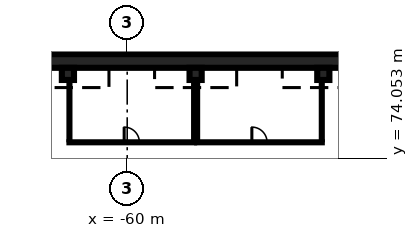
"""IFC4 building model, lengths in metres.
Left out: names, types, materials, properties, quantities, classifications, styles, units other than length and angle.
Written with IfcOpenShell. Run it as: python <this file> out.ifc"""

import sys

from ifc_helpers import new_model, si_unit, direction, frame, frame_2d, origin, origin_2d, place, context, subcontext, project, spatial, rectangle, extrude, element, fill, save


model = new_model("IFC4")
c1 = context("Model", 3, precision=1e-05, world=origin(), true_north=direction((0.0, 1.0)))
c2 = subcontext(c1, "Body", "Model", "MODEL_VIEW")
j1 = project(units=[si_unit("LENGTHUNIT", "METRE"), si_unit("PLANEANGLEUNIT", "RADIAN")], contexts=[c1])
p1 = place(None, origin())
s1 = spatial("IfcSite", under=j1, at=p1, CompositionType="ELEMENT")
p2 = place(p1, origin())
s2 = spatial("IfcBuilding", under=s1, at=p2, CompositionType="ELEMENT")
p3 = place(p2, frame((0.0, 0.0, -12.0)))
s3 = spatial("IfcBuildingStorey", under=s2, at=p3, CompositionType="ELEMENT", Elevation=-12.0)
p4 = place(p3, frame((-123.6, 80.45, 0.0), z_axis=(0.0, 0.0, 1.0), x_axis=(1.0, 0.0, 0.0)))
e1 = element("IfcWall", 1, at=p4, inside=s3, PredefinedType="USERDEFINED", context=c2, shape_type="SweptSolid", body=[
    extrude(rectangle(XDim=169.8, YDim=0.9, at=frame_2d((84.9, 0.0))), origin(), (0.0, 0.0, 1.0), 11.55),
])
for number, where, z_axis, x_axis in (
    (2, (-63.9, 79.6, 0.0), (0.0, 0.0, 1.0), (1.0, 0.0, 0.0)),
    (3, (-55.5, 79.6, 0.0), (0.0, 0.0, 1.0), (1.0, 0.0, 0.0)),
    (4, (-47.1, 79.6, 0.0), (0.0, 0.0, 1.0), (1.0, 0.0, 0.0)),
):
    element("IfcColumn", number, at=place(p3, frame(where, z_axis=z_axis, x_axis=x_axis)), inside=s3, PredefinedType="COLUMN", context=c2, shape_type="SweptSolid", body=[
        extrude(rectangle(XDim=0.8, YDim=0.8, at=origin_2d()), origin(), (0.0, 0.0, 1.0), 4.4),
    ])
p5 = place(p3, frame((-63.9, 75.1, 0.0), z_axis=(0.0, 0.0, 1.0), x_axis=(1.0, 0.0, 0.0)))
e5 = element("IfcWall", 5, at=p5, inside=s3, PredefinedType="PARTITIONING", context=c2, shape_type="SweptSolid", body=[
    extrude(rectangle(XDim=8.4, YDim=0.2, at=frame_2d((4.2, 0.0))), origin(), (0.0, 0.0, 1.0), 4.4),
])
p6 = place(p5, frame((3.7, 0.0, 0.0)))
e6 = element("IfcOpeningElement", 6, at=p6, cuts=e5, PredefinedType="OPENING", context=c2, shape_type="SweptSolid", body=[
    extrude(rectangle(XDim=1.0, YDim=2.1, at=frame_2d((0.5, 1.05))), frame((0.0, 0.11, 0.0), z_axis=(0.0, -1.0, 0.0), x_axis=(1.0, 0.0, 0.0)), (0.0, 0.0, 1.0), 0.22),
])
for number, where, z_axis, x_axis in (
    (7, (-63.8, 75.2, 0.0), (0.0, 0.0, 1.0), (0.0, 1.0, 0.0)),
    (8, (-55.6, 75.2, 0.0), (0.0, 0.0, 1.0), (0.0, 1.0, 0.0)),
):
    element("IfcWall", number, at=place(p3, frame(where, z_axis=z_axis, x_axis=x_axis)), inside=s3, PredefinedType="PARTITIONING", context=c2, shape_type="SweptSolid", body=[
        extrude(rectangle(XDim=4.0, YDim=0.2, at=frame_2d((2.0, 0.0))), origin(), (0.0, 0.0, 1.0), 4.4),
    ])
p7 = place(p3, frame((-55.5, 75.1, 0.0), z_axis=(0.0, 0.0, 1.0), x_axis=(1.0, 0.0, 0.0)))
e9 = element("IfcWall", 9, at=p7, inside=s3, PredefinedType="PARTITIONING", context=c2, shape_type="SweptSolid", body=[
    extrude(rectangle(XDim=8.4, YDim=0.2, at=frame_2d((4.2, 0.0))), origin(), (0.0, 0.0, 1.0), 4.4),
])
p8 = place(p7, frame((3.7, 0.0, 0.0)))
e10 = element("IfcOpeningElement", 10, at=p8, cuts=e9, PredefinedType="OPENING", context=c2, shape_type="SweptSolid", body=[
    extrude(rectangle(XDim=1.0, YDim=2.1, at=frame_2d((0.5, 1.05))), frame((0.0, 0.11, 0.0), z_axis=(0.0, -1.0, 0.0), x_axis=(1.0, 0.0, 0.0)), (0.0, 0.0, 1.0), 0.22),
])
for number, where, z_axis, x_axis in (
    (11, (-55.4, 75.2, 0.0), (0.0, 0.0, 1.0), (0.0, 1.0, 0.0)),
    (12, (-47.2, 75.2, 0.0), (0.0, 0.0, 1.0), (0.0, 1.0, 0.0)),
):
    element("IfcWall", number, at=place(p3, frame(where, z_axis=z_axis, x_axis=x_axis)), inside=s3, PredefinedType="PARTITIONING", context=c2, shape_type="SweptSolid", body=[
        extrude(rectangle(XDim=4.0, YDim=0.2, at=frame_2d((2.0, 0.0))), origin(), (0.0, 0.0, 1.0), 4.4),
    ])
p9 = place(p6, origin())
e13 = element("IfcDoor", 13, at=p9, inside=s3, OperationType="SINGLE_SWING_LEFT", PredefinedType="DOOR", context=c2, shape_type="SweptSolid", body=[
    extrude(rectangle(XDim=1.0, YDim=2.1, at=frame_2d((0.5, 1.05))), frame((0.0, 0.025, 0.0), z_axis=(0.0, -1.0, 0.0), x_axis=(1.0, 0.0, 0.0)), (0.0, 0.0, 1.0), 0.05),
])
fill(e6, e13)
p10 = place(p8, origin())
e14 = element("IfcDoor", 14, at=p10, inside=s3, OperationType="SINGLE_SWING_LEFT", PredefinedType="DOOR", context=c2, shape_type="SweptSolid", body=[
    extrude(rectangle(XDim=1.0, YDim=2.1, at=frame_2d((0.5, 1.05))), frame((0.0, 0.025, 0.0), z_axis=(0.0, -1.0, 0.0), x_axis=(1.0, 0.0, 0.0)), (0.0, 0.0, 1.0), 0.05),
])
fill(e10, e14)
save(model, sys.argv[1])
